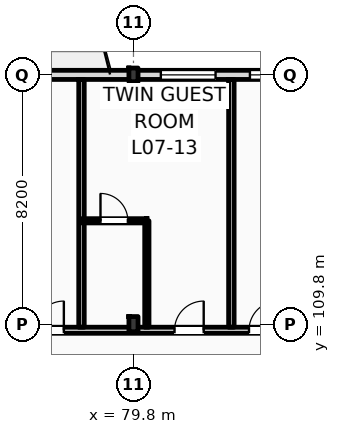
"""IFC4 building model, lengths in metres.
Left out: names, types, materials, properties, quantities, classifications, styles, units other than length and angle.
Written with IfcOpenShell. Run it as: python <this file> out.ifc"""

import sys

from ifc_helpers import new_model, si_unit, direction, frame, frame_2d, origin, origin_2d, place, context, subcontext, project, spatial, rectangle, i_section, extrude, element, fill, save


model = new_model("IFC4")
c1 = context("Model", 3, precision=1e-05, world=origin(), true_north=direction((0.0, 1.0)))
c2 = subcontext(c1, "Body", "Model", "MODEL_VIEW")
j1 = project(units=[si_unit("LENGTHUNIT", "METRE"), si_unit("PLANEANGLEUNIT", "RADIAN")], contexts=[c1])
p1 = place(None, origin())
s1 = spatial("IfcSite", under=j1, at=p1, CompositionType="ELEMENT")
p2 = place(p1, origin())
s2 = spatial("IfcBuilding", under=s1, at=p2, CompositionType="ELEMENT")
p3 = place(p2, frame((0.0, 0.0, 31.8)))
s3 = spatial("IfcBuildingStorey", under=s2, at=p3, CompositionType="ELEMENT", Elevation=31.8)
p4 = place(p3, frame((79.8, 109.8, 0.0), z_axis=(0.0, 0.0, 1.0), x_axis=(1.0, 0.0, 0.0)))
e1 = element("IfcColumn", 1, at=p4, inside=s3, PredefinedType="COLUMN", context=c2, shape_type="SweptSolid", body=[
    extrude(i_section(OverallWidth=0.3, OverallDepth=0.5, WebThickness=0.014, FlangeThickness=0.028, FilletRadius=0.027, at=origin_2d()), origin(), (0.0, 0.0, 1.0), 3.6),
])
p5 = place(p3, frame((79.8, 118.0, 0.0), z_axis=(0.0, 0.0, 1.0), x_axis=(1.0, 0.0, 0.0)))
e2 = element("IfcColumn", 2, at=p5, inside=s3, PredefinedType="COLUMN", context=c2, shape_type="SweptSolid", body=[
    extrude(i_section(OverallWidth=0.3, OverallDepth=0.45, WebThickness=0.014, FlangeThickness=0.026, FilletRadius=0.027, at=origin_2d()), origin(), (0.0, 0.0, 1.0), 3.6),
])
p6 = place(p3, frame((22.5, 118.0, 0.0), z_axis=(0.0, 0.0, 1.0), x_axis=(1.0, 0.0, 0.0)))
e3 = element("IfcWall", 3, at=p6, inside=s3, PredefinedType="STANDARD", context=c2, shape_type="SweptSolid", body=[
    extrude(rectangle(XDim=97.5, YDim=0.3, at=frame_2d((48.75, 0.0))), origin(), (0.0, 0.0, 1.0), 2.72),
])
p7 = place(p6, frame((3.61, 0.0, 0.9)))
e4 = element("IfcOpeningElement", 4, at=p7, cuts=e3, PredefinedType="OPENING", context=c2, shape_type="SweptSolid", body=[
    extrude(rectangle(XDim=1.1, YDim=1.64, at=frame_2d((0.55, 0.82))), frame((0.0, 0.16, 0.0), z_axis=(0.0, -1.0, 0.0), x_axis=(1.0, 0.0, 0.0)), (0.0, 0.0, 1.0), 0.32),
])
p8 = place(p6, frame((6.855, 0.0, 0.0)))
e5 = element("IfcOpeningElement", 5, at=p8, cuts=e3, PredefinedType="OPENING", context=c2, shape_type="SweptSolid", body=[
    extrude(rectangle(XDim=1.2, YDim=2.25, at=frame_2d((0.6, 1.125))), frame((0.0, 0.16, 0.0), z_axis=(0.0, -1.0, 0.0), x_axis=(1.0, 0.0, 0.0)), (0.0, 0.0, 1.0), 0.32),
])
p9 = place(p6, frame((11.405, 0.0, 0.9)))
e6 = element("IfcOpeningElement", 6, at=p9, cuts=e3, PredefinedType="OPENING", context=c2, shape_type="SweptSolid", body=[
    extrude(rectangle(XDim=2.1, YDim=1.64, at=frame_2d((1.05, 0.82))), frame((0.0, 0.16, 0.0), z_axis=(0.0, -1.0, 0.0), x_axis=(1.0, 0.0, 0.0)), (0.0, 0.0, 1.0), 0.32),
])
p10 = place(p6, frame((15.13, 0.0, 0.9)))
e7 = element("IfcOpeningElement", 7, at=p10, cuts=e3, PredefinedType="OPENING", context=c2, shape_type="SweptSolid", body=[
    extrude(rectangle(XDim=2.25, YDim=1.64, at=frame_2d((1.125, 0.82))), frame((0.0, 0.16, 0.0), z_axis=(0.0, -1.0, 0.0), x_axis=(1.0, 0.0, 0.0)), (0.0, 0.0, 1.0), 0.32),
])
p11 = place(p6, frame((21.53, 0.0, 0.0)))
e8 = element("IfcOpeningElement", 8, at=p11, cuts=e3, PredefinedType="OPENING", context=c2, shape_type="SweptSolid", body=[
    extrude(rectangle(XDim=1.2, YDim=2.25, at=frame_2d((0.6, 1.125))), frame((0.0, 0.16, 0.0), z_axis=(0.0, -1.0, 0.0), x_axis=(1.0, 0.0, 0.0)), (0.0, 0.0, 1.0), 0.32),
])
p12 = place(p6, frame((24.18, 0.0, 0.9)))
e9 = element("IfcOpeningElement", 9, at=p12, cuts=e3, PredefinedType="OPENING", context=c2, shape_type="SweptSolid", body=[
    extrude(rectangle(XDim=1.1, YDim=1.64, at=frame_2d((0.55, 0.82))), frame((0.0, 0.16, 0.0), z_axis=(0.0, -1.0, 0.0), x_axis=(1.0, 0.0, 0.0)), (0.0, 0.0, 1.0), 0.32),
])
p13 = place(p6, frame((29.105, 0.0, 0.9)))
e10 = element("IfcOpeningElement", 10, at=p13, cuts=e3, PredefinedType="OPENING", context=c2, shape_type="SweptSolid", body=[
    extrude(rectangle(XDim=2.7, YDim=1.64, at=frame_2d((1.35, 0.82))), frame((0.0, 0.16, 0.0), z_axis=(0.0, -1.0, 0.0), x_axis=(1.0, 0.0, 0.0)), (0.0, 0.0, 1.0), 0.32),
])
p14 = place(p6, frame((34.83, 0.0, 0.9)))
e11 = element("IfcOpeningElement", 11, at=p14, cuts=e3, PredefinedType="OPENING", context=c2, shape_type="SweptSolid", body=[
    extrude(rectangle(XDim=1.8, YDim=1.64, at=frame_2d((0.9, 0.82))), frame((0.0, 0.16, 0.0), z_axis=(0.0, -1.0, 0.0), x_axis=(1.0, 0.0, 0.0)), (0.0, 0.0, 1.0), 0.32),
])
p15 = place(p6, frame((38.525, 0.0, 0.0)))
e12 = element("IfcOpeningElement", 12, at=p15, cuts=e3, PredefinedType="OPENING", context=c2, shape_type="SweptSolid", body=[
    extrude(rectangle(XDim=1.2, YDim=2.25, at=frame_2d((0.6, 1.125))), frame((0.0, 0.16, 0.0), z_axis=(0.0, -1.0, 0.0), x_axis=(1.0, 0.0, 0.0)), (0.0, 0.0, 1.0), 0.32),
])
p16 = place(p6, frame((42.73, 0.0, 0.9)))
e13 = element("IfcOpeningElement", 13, at=p16, cuts=e3, PredefinedType="OPENING", context=c2, shape_type="SweptSolid", body=[
    extrude(rectangle(XDim=3.05, YDim=1.64, at=frame_2d((1.525, 0.82))), frame((0.0, 0.16, 0.0), z_axis=(0.0, -1.0, 0.0), x_axis=(1.0, 0.0, 0.0)), (0.0, 0.0, 1.0), 0.32),
])
p17 = place(p6, frame((47.155, 0.0, 0.9)))
e14 = element("IfcOpeningElement", 14, at=p17, cuts=e3, PredefinedType="OPENING", context=c2, shape_type="SweptSolid", body=[
    extrude(rectangle(XDim=1.35, YDim=1.64, at=frame_2d((0.675, 0.82))), frame((0.0, 0.16, 0.0), z_axis=(0.0, -1.0, 0.0), x_axis=(1.0, 0.0, 0.0)), (0.0, 0.0, 1.0), 0.32),
])
p18 = place(p6, frame((53.065, 0.0, 0.0)))
e15 = element("IfcOpeningElement", 15, at=p18, cuts=e3, PredefinedType="OPENING", context=c2, shape_type="SweptSolid", body=[
    extrude(rectangle(XDim=1.2, YDim=2.25, at=frame_2d((0.6, 1.125))), frame((0.0, 0.16, 0.0), z_axis=(0.0, -1.0, 0.0), x_axis=(1.0, 0.0, 0.0)), (0.0, 0.0, 1.0), 0.32),
])
p19 = place(p6, frame((58.2, 0.0, 0.9)))
e16 = element("IfcOpeningElement", 16, at=p19, cuts=e3, PredefinedType="OPENING", context=c2, shape_type="SweptSolid", body=[
    extrude(rectangle(XDim=1.8, YDim=1.64, at=frame_2d((0.9, 0.82))), frame((0.0, 0.16, 0.0), z_axis=(0.0, -1.0, 0.0), x_axis=(1.0, 0.0, 0.0)), (0.0, 0.0, 1.0), 0.32),
])
p20 = place(p6, frame((61.13, 0.0, 0.9)))
e17 = element("IfcOpeningElement", 17, at=p20, cuts=e3, PredefinedType="OPENING", context=c2, shape_type="SweptSolid", body=[
    extrude(rectangle(XDim=3.05, YDim=1.64, at=frame_2d((1.525, 0.82))), frame((0.0, 0.16, 0.0), z_axis=(0.0, -1.0, 0.0), x_axis=(1.0, 0.0, 0.0)), (0.0, 0.0, 1.0), 0.32),
])
p21 = place(p6, frame((67.93, 0.0, 0.0)))
e18 = element("IfcOpeningElement", 18, at=p21, cuts=e3, PredefinedType="OPENING", context=c2, shape_type="SweptSolid", body=[
    extrude(rectangle(XDim=1.2, YDim=2.25, at=frame_2d((0.6, 1.125))), frame((0.0, 0.16, 0.0), z_axis=(0.0, -1.0, 0.0), x_axis=(1.0, 0.0, 0.0)), (0.0, 0.0, 1.0), 0.32),
])
p22 = place(p6, frame((70.39, 0.0, 0.0)))
e19 = element("IfcOpeningElement", 19, at=p22, cuts=e3, PredefinedType="OPENING", context=c2, shape_type="SweptSolid", body=[
    extrude(rectangle(XDim=1.2, YDim=2.25, at=frame_2d((0.6, 1.125))), frame((0.0, 0.16, 0.0), z_axis=(0.0, -1.0, 0.0), x_axis=(1.0, 0.0, 0.0)), (0.0, 0.0, 1.0), 0.32),
])
p23 = place(p6, frame((75.905, 0.0, 0.9)))
e20 = element("IfcOpeningElement", 20, at=p23, cuts=e3, PredefinedType="OPENING", context=c2, shape_type="SweptSolid", body=[
    extrude(rectangle(XDim=1.1, YDim=1.5, at=frame_2d((0.55, 0.75))), frame((0.0, 0.16, 0.0), z_axis=(0.0, -1.0, 0.0), x_axis=(1.0, 0.0, 0.0)), (0.0, 0.0, 1.0), 0.32),
])
p24 = place(p6, frame((81.63, 0.0, 0.9)))
e21 = element("IfcOpeningElement", 21, at=p24, cuts=e3, PredefinedType="OPENING", context=c2, shape_type="SweptSolid", body=[
    extrude(rectangle(XDim=1.1, YDim=1.6, at=frame_2d((0.55, 0.8))), frame((0.0, 0.16, 0.0), z_axis=(0.0, -1.0, 0.0), x_axis=(1.0, 0.0, 0.0)), (0.0, 0.0, 1.0), 0.32),
])
p25 = place(p6, frame((84.955, 0.0, 0.9)))
e22 = element("IfcOpeningElement", 22, at=p25, cuts=e3, PredefinedType="OPENING", context=c2, shape_type="SweptSolid", body=[
    extrude(rectangle(XDim=1.4, YDim=1.64, at=frame_2d((0.7, 0.82))), frame((0.0, 0.16, 0.0), z_axis=(0.0, -1.0, 0.0), x_axis=(1.0, 0.0, 0.0)), (0.0, 0.0, 1.0), 0.32),
])
p26 = place(p6, frame((90.055, 0.0, 0.9)))
e23 = element("IfcOpeningElement", 23, at=p26, cuts=e3, PredefinedType="OPENING", context=c2, shape_type="SweptSolid", body=[
    extrude(rectangle(XDim=1.6, YDim=1.64, at=frame_2d((0.8, 0.82))), frame((0.0, 0.16, 0.0), z_axis=(0.0, -1.0, 0.0), x_axis=(1.0, 0.0, 0.0)), (0.0, 0.0, 1.0), 0.32),
])
p27 = place(p6, frame((93.87, 0.0, 0.9)))
e24 = element("IfcOpeningElement", 24, at=p27, cuts=e3, PredefinedType="OPENING", context=c2, shape_type="SweptSolid", body=[
    extrude(rectangle(XDim=1.75, YDim=1.64, at=frame_2d((0.875, 0.82))), frame((0.0, 0.16, 0.0), z_axis=(0.0, -1.0, 0.0), x_axis=(1.0, 0.0, 0.0)), (0.0, 0.0, 1.0), 0.32),
])
p28 = place(p3, frame((10.65, 109.6, 0.0), z_axis=(0.0, 0.0, 1.0), x_axis=(1.0, 0.0, 0.0)))
e25 = element("IfcWall", 25, at=p28, inside=s3, PredefinedType="PARTITIONING", context=c2, shape_type="SweptSolid", body=[
    extrude(rectangle(XDim=109.21, YDim=0.2, at=frame_2d((54.605, 0.0))), origin(), (0.0, 0.0, 1.0), 2.72),
])
p29 = place(p28, frame((15.825, 0.0, 0.0)))
e26 = element("IfcOpeningElement", 26, at=p29, cuts=e25, PredefinedType="OPENING", context=c2, shape_type="SweptSolid", body=[
    extrude(rectangle(XDim=1.02, YDim=2.2, at=frame_2d((0.51, 1.1))), frame((0.0, 0.11, 0.0), z_axis=(0.0, -1.0, 0.0), x_axis=(1.0, 0.0, 0.0)), (0.0, 0.0, 1.0), 0.22),
])
p30 = place(p28, frame((19.87, 0.0, 0.0)))
e27 = element("IfcOpeningElement", 27, at=p30, cuts=e25, PredefinedType="OPENING", context=c2, shape_type="SweptSolid", body=[
    extrude(rectangle(XDim=1.02, YDim=2.2, at=frame_2d((0.51, 1.1))), frame((0.0, 0.11, 0.0), z_axis=(0.0, -1.0, 0.0), x_axis=(1.0, 0.0, 0.0)), (0.0, 0.0, 1.0), 0.22),
])
p31 = place(p28, frame((24.47, 0.0, 0.0)))
e28 = element("IfcOpeningElement", 28, at=p31, cuts=e25, PredefinedType="OPENING", context=c2, shape_type="SweptSolid", body=[
    extrude(rectangle(XDim=1.02, YDim=2.2, at=frame_2d((0.51, 1.1))), frame((0.0, 0.11, 0.0), z_axis=(0.0, -1.0, 0.0), x_axis=(1.0, 0.0, 0.0)), (0.0, 0.0, 1.0), 0.22),
])
p32 = place(p28, frame((26.92, 0.0, 0.0)))
e29 = element("IfcOpeningElement", 29, at=p32, cuts=e25, PredefinedType="OPENING", context=c2, shape_type="SweptSolid", body=[
    extrude(rectangle(XDim=1.02, YDim=2.2, at=frame_2d((0.51, 1.1))), frame((0.0, 0.11, 0.0), z_axis=(0.0, -1.0, 0.0), x_axis=(1.0, 0.0, 0.0)), (0.0, 0.0, 1.0), 0.22),
])
p33 = place(p28, frame((33.7, 0.0, 0.0)))
e30 = element("IfcOpeningElement", 30, at=p33, cuts=e25, PredefinedType="OPENING", context=c2, shape_type="SweptSolid", body=[
    extrude(rectangle(XDim=0.96, YDim=2.2, at=frame_2d((0.48, 1.1))), frame((0.0, 0.11, 0.0), z_axis=(0.0, -1.0, 0.0), x_axis=(1.0, 0.0, 0.0)), (0.0, 0.0, 1.0), 0.22),
])
p34 = place(p28, frame((35.9, 0.0, 0.0)))
e31 = element("IfcOpeningElement", 31, at=p34, cuts=e25, PredefinedType="OPENING", context=c2, shape_type="SweptSolid", body=[
    extrude(rectangle(XDim=0.96, YDim=2.2, at=frame_2d((0.48, 1.1))), frame((0.0, 0.11, 0.0), z_axis=(0.0, -1.0, 0.0), x_axis=(1.0, 0.0, 0.0)), (0.0, 0.0, 1.0), 0.22),
])
p35 = place(p28, frame((42.9, 0.0, 0.0)))
e32 = element("IfcOpeningElement", 32, at=p35, cuts=e25, PredefinedType="OPENING", context=c2, shape_type="SweptSolid", body=[
    extrude(rectangle(XDim=0.96, YDim=2.2, at=frame_2d((0.48, 1.1))), frame((0.0, 0.11, 0.0), z_axis=(0.0, -1.0, 0.0), x_axis=(1.0, 0.0, 0.0)), (0.0, 0.0, 1.0), 0.22),
])
p36 = place(p28, frame((47.5, 0.0, 0.0)))
e33 = element("IfcOpeningElement", 33, at=p36, cuts=e25, PredefinedType="OPENING", context=c2, shape_type="SweptSolid", body=[
    extrude(rectangle(XDim=0.96, YDim=2.2, at=frame_2d((0.48, 1.1))), frame((0.0, 0.11, 0.0), z_axis=(0.0, -1.0, 0.0), x_axis=(1.0, 0.0, 0.0)), (0.0, 0.0, 1.0), 0.22),
])
p37 = place(p28, frame((49.95, 0.0, 0.0)))
e34 = element("IfcOpeningElement", 34, at=p37, cuts=e25, PredefinedType="OPENING", context=c2, shape_type="SweptSolid", body=[
    extrude(rectangle(XDim=0.96, YDim=2.2, at=frame_2d((0.48, 1.1))), frame((0.0, 0.11, 0.0), z_axis=(0.0, -1.0, 0.0), x_axis=(1.0, 0.0, 0.0)), (0.0, 0.0, 1.0), 0.22),
])
p38 = place(p28, frame((56.7, 0.0, 0.0)))
e35 = element("IfcOpeningElement", 35, at=p38, cuts=e25, PredefinedType="OPENING", context=c2, shape_type="SweptSolid", body=[
    extrude(rectangle(XDim=0.96, YDim=2.2, at=frame_2d((0.48, 1.1))), frame((0.0, 0.11, 0.0), z_axis=(0.0, -1.0, 0.0), x_axis=(1.0, 0.0, 0.0)), (0.0, 0.0, 1.0), 0.22),
])
p39 = place(p28, frame((59.15, 0.0, 0.0)))
e36 = element("IfcOpeningElement", 36, at=p39, cuts=e25, PredefinedType="OPENING", context=c2, shape_type="SweptSolid", body=[
    extrude(rectangle(XDim=0.96, YDim=2.2, at=frame_2d((0.48, 1.1))), frame((0.0, 0.11, 0.0), z_axis=(0.0, -1.0, 0.0), x_axis=(1.0, 0.0, 0.0)), (0.0, 0.0, 1.0), 0.22),
])
p40 = place(p28, frame((65.9, 0.0, 0.0)))
e37 = element("IfcOpeningElement", 37, at=p40, cuts=e25, PredefinedType="OPENING", context=c2, shape_type="SweptSolid", body=[
    extrude(rectangle(XDim=0.96, YDim=2.2, at=frame_2d((0.48, 1.1))), frame((0.0, 0.11, 0.0), z_axis=(0.0, -1.0, 0.0), x_axis=(1.0, 0.0, 0.0)), (0.0, 0.0, 1.0), 0.22),
])
p41 = place(p28, frame((70.5, 0.0, 0.0)))
e38 = element("IfcOpeningElement", 38, at=p41, cuts=e25, PredefinedType="OPENING", context=c2, shape_type="SweptSolid", body=[
    extrude(rectangle(XDim=0.96, YDim=2.2, at=frame_2d((0.48, 1.1))), frame((0.0, 0.11, 0.0), z_axis=(0.0, -1.0, 0.0), x_axis=(1.0, 0.0, 0.0)), (0.0, 0.0, 1.0), 0.22),
])
p42 = place(p28, frame((72.95, 0.0, 0.0)))
e39 = element("IfcOpeningElement", 39, at=p42, cuts=e25, PredefinedType="OPENING", context=c2, shape_type="SweptSolid", body=[
    extrude(rectangle(XDim=0.96, YDim=2.2, at=frame_2d((0.48, 1.1))), frame((0.0, 0.11, 0.0), z_axis=(0.0, -1.0, 0.0), x_axis=(1.0, 0.0, 0.0)), (0.0, 0.0, 1.0), 0.22),
])
p43 = place(p28, frame((79.7, 0.0, 0.0)))
e40 = element("IfcOpeningElement", 40, at=p43, cuts=e25, PredefinedType="OPENING", context=c2, shape_type="SweptSolid", body=[
    extrude(rectangle(XDim=0.96, YDim=2.2, at=frame_2d((0.48, 1.1))), frame((0.0, 0.11, 0.0), z_axis=(0.0, -1.0, 0.0), x_axis=(1.0, 0.0, 0.0)), (0.0, 0.0, 1.0), 0.22),
])
p44 = place(p28, frame((82.15, 0.0, 0.0)))
e41 = element("IfcOpeningElement", 41, at=p44, cuts=e25, PredefinedType="OPENING", context=c2, shape_type="SweptSolid", body=[
    extrude(rectangle(XDim=0.96, YDim=2.2, at=frame_2d((0.48, 1.1))), frame((0.0, 0.11, 0.0), z_axis=(0.0, -1.0, 0.0), x_axis=(1.0, 0.0, 0.0)), (0.0, 0.0, 1.0), 0.22),
])
p45 = place(p28, frame((88.9, 0.0, 0.0)))
e42 = element("IfcOpeningElement", 42, at=p45, cuts=e25, PredefinedType="OPENING", context=c2, shape_type="SweptSolid", body=[
    extrude(rectangle(XDim=0.96, YDim=2.2, at=frame_2d((0.48, 1.1))), frame((0.0, 0.11, 0.0), z_axis=(0.0, -1.0, 0.0), x_axis=(1.0, 0.0, 0.0)), (0.0, 0.0, 1.0), 0.22),
])
p46 = place(p28, frame((93.75, 0.0, 0.0)))
e43 = element("IfcOpeningElement", 43, at=p46, cuts=e25, PredefinedType="OPENING", context=c2, shape_type="SweptSolid", body=[
    extrude(rectangle(XDim=0.96, YDim=2.2, at=frame_2d((0.48, 1.1))), frame((0.0, 0.11, 0.0), z_axis=(0.0, -1.0, 0.0), x_axis=(1.0, 0.0, 0.0)), (0.0, 0.0, 1.0), 0.22),
])
p47 = place(p28, frame((98.1, 0.0, 0.0)))
e44 = element("IfcOpeningElement", 44, at=p47, cuts=e25, PredefinedType="OPENING", context=c2, shape_type="SweptSolid", body=[
    extrude(rectangle(XDim=0.96, YDim=2.2, at=frame_2d((0.48, 1.1))), frame((0.0, 0.11, 0.0), z_axis=(0.0, -1.0, 0.0), x_axis=(1.0, 0.0, 0.0)), (0.0, 0.0, 1.0), 0.22),
])
p48 = place(p28, frame((102.7, 0.0, 0.0)))
e45 = element("IfcOpeningElement", 45, at=p48, cuts=e25, PredefinedType="OPENING", context=c2, shape_type="SweptSolid", body=[
    extrude(rectangle(XDim=0.96, YDim=2.2, at=frame_2d((0.48, 1.1))), frame((0.0, 0.11, 0.0), z_axis=(0.0, -1.0, 0.0), x_axis=(1.0, 0.0, 0.0)), (0.0, 0.0, 1.0), 0.22),
])
p49 = place(p28, frame((105.04, 0.0, 0.0)))
e46 = element("IfcOpeningElement", 46, at=p49, cuts=e25, PredefinedType="OPENING", context=c2, shape_type="SweptSolid", body=[
    extrude(rectangle(XDim=0.96, YDim=2.2, at=frame_2d((0.48, 1.1))), frame((0.0, 0.11, 0.0), z_axis=(0.0, -1.0, 0.0), x_axis=(1.0, 0.0, 0.0)), (0.0, 0.0, 1.0), 0.22),
])
p50 = place(p28, frame((2.716, 0.0, 0.0)))
e47 = element("IfcOpeningElement", 47, at=p50, cuts=e25, PredefinedType="OPENING", context=c2, shape_type="SweptSolid", body=[
    extrude(rectangle(XDim=1.35, YDim=2.25, at=frame_2d((0.675, 1.125))), frame((0.0, 0.11, 0.0), z_axis=(0.0, -1.0, 0.0), x_axis=(1.0, 0.0, 0.0)), (0.0, 0.0, 1.0), 0.22),
])
p51 = place(p28, frame((6.65, 0.0, 0.0)))
e48 = element("IfcOpeningElement", 48, at=p51, cuts=e25, PredefinedType="OPENING", context=c2, shape_type="SweptSolid", body=[
    extrude(rectangle(XDim=1.35, YDim=2.25, at=frame_2d((0.675, 1.125))), frame((0.0, 0.11, 0.0), z_axis=(0.0, -1.0, 0.0), x_axis=(1.0, 0.0, 0.0)), (0.0, 0.0, 1.0), 0.22),
])
p52 = place(p28, frame((10.583, 0.0, 0.0)))
e49 = element("IfcOpeningElement", 49, at=p52, cuts=e25, PredefinedType="OPENING", context=c2, shape_type="SweptSolid", body=[
    extrude(rectangle(XDim=1.35, YDim=2.25, at=frame_2d((0.675, 1.125))), frame((0.0, 0.11, 0.0), z_axis=(0.0, -1.0, 0.0), x_axis=(1.0, 0.0, 0.0)), (0.0, 0.0, 1.0), 0.22),
])
for number, where, z_axis, x_axis in (
    (50, (78.09, 109.7, 0.0), (0.0, 0.0, 1.0), (0.0, 1.0, 0.0)),
    (51, (83.02, 109.7, 0.0), (0.0, 0.0, 1.0), (0.0, 1.0, 0.0)),
):
    element("IfcWall", number, at=place(p3, frame(where, z_axis=z_axis, x_axis=x_axis)), inside=s3, PredefinedType="PARTITIONING", context=c2, shape_type="SweptSolid", body=[
        extrude(rectangle(XDim=8.15, YDim=0.18, at=frame_2d((4.075, 0.0))), origin(), (0.0, 0.0, 1.0), 3.36),
    ])
p53 = place(p3, frame((80.24, 109.7, 0.0), z_axis=(0.0, 0.0, 1.0), x_axis=(0.0, 1.0, 0.0)))
e52 = element("IfcWall", 52, at=p53, inside=s3, PredefinedType="PARTITIONING", context=c2, shape_type="SweptSolid", body=[
    extrude(rectangle(XDim=3.5, YDim=0.14, at=frame_2d((1.75, 0.0))), origin(), (0.0, 0.0, 1.0), 3.36),
])
p54 = place(p3, frame((78.09, 113.2, 0.0), z_axis=(0.0, 0.0, 1.0), x_axis=(1.0, 0.0, 0.0)))
e53 = element("IfcWall", 53, at=p54, inside=s3, PredefinedType="PARTITIONING", context=c2, shape_type="SweptSolid", body=[
    extrude(rectangle(XDim=2.15, YDim=0.14, at=frame_2d((1.075, 0.0))), origin(), (0.0, 0.0, 1.0), 3.36),
])
p55 = place(p54, frame((0.625, 0.0, 0.0)))
e54 = element("IfcOpeningElement", 54, at=p55, cuts=e53, PredefinedType="OPENING", context=c2, shape_type="SweptSolid", body=[
    extrude(rectangle(XDim=0.9, YDim=2.1, at=frame_2d((0.45, 1.05))), frame((0.0, 0.08, 0.0), z_axis=(0.0, -1.0, 0.0), x_axis=(1.0, 0.0, 0.0)), (0.0, 0.0, 1.0), 0.16),
])
p56 = place(p19, origin())
e55 = element("IfcWindow", 55, at=p56, inside=s3, PartitioningType="DOUBLE_PANEL_VERTICAL", PredefinedType="WINDOW", context=c2, shape_type="SweptSolid", body=[
    extrude(rectangle(XDim=1.8, YDim=1.64, at=frame_2d((0.9, 0.82))), frame((0.0, 0.03, 0.0), z_axis=(0.0, -1.0, 0.0), x_axis=(1.0, 0.0, 0.0)), (0.0, 0.0, 1.0), 0.06),
])
fill(e16, e55)
p57 = place(p20, origin())
e56 = element("IfcWindow", 56, at=p57, inside=s3, PartitioningType="DOUBLE_PANEL_VERTICAL", PredefinedType="WINDOW", context=c2, shape_type="SweptSolid", body=[
    extrude(rectangle(XDim=3.05, YDim=1.64, at=frame_2d((1.525, 0.82))), frame((0.0, 0.03, 0.0), z_axis=(0.0, -1.0, 0.0), x_axis=(1.0, 0.0, 0.0)), (0.0, 0.0, 1.0), 0.06),
])
fill(e17, e56)
p58 = place(p40, origin())
e57 = element("IfcDoor", 57, at=p58, inside=s3, OperationType="SINGLE_SWING_RIGHT", PredefinedType="DOOR", context=c2, shape_type="SweptSolid", body=[
    extrude(rectangle(XDim=0.96, YDim=2.2, at=frame_2d((0.48, 1.1))), frame((0.0, 0.025, 0.0), z_axis=(0.0, -1.0, 0.0), x_axis=(1.0, 0.0, 0.0)), (0.0, 0.0, 1.0), 0.05),
])
fill(e37, e57)
p59 = place(p41, origin())
e58 = element("IfcDoor", 58, at=p59, inside=s3, OperationType="SINGLE_SWING_RIGHT", PredefinedType="DOOR", context=c2, shape_type="SweptSolid", body=[
    extrude(rectangle(XDim=0.96, YDim=2.2, at=frame_2d((0.48, 1.1))), frame((0.0, 0.025, 0.0), z_axis=(0.0, -1.0, 0.0), x_axis=(1.0, 0.0, 0.0)), (0.0, 0.0, 1.0), 0.05),
])
fill(e38, e58)
p60 = place(p55, origin())
e59 = element("IfcDoor", 59, at=p60, inside=s3, OperationType="SINGLE_SWING_LEFT", PredefinedType="DOOR", context=c2, shape_type="SweptSolid", body=[
    extrude(rectangle(XDim=0.9, YDim=2.1, at=frame_2d((0.45, 1.05))), frame((0.0, 0.025, 0.0), z_axis=(0.0, -1.0, 0.0), x_axis=(1.0, 0.0, 0.0)), (0.0, 0.0, 1.0), 0.05),
])
fill(e54, e59)
p61 = place(p42, origin())
e60 = element("IfcDoor", 60, at=p61, inside=s3, OperationType="SINGLE_SWING_RIGHT", PredefinedType="DOOR", context=c2, shape_type="SweptSolid", body=[
    extrude(rectangle(XDim=0.96, YDim=2.2, at=frame_2d((0.48, 1.1))), frame((0.0, 0.025, 0.0), z_axis=(0.0, -1.0, 0.0), x_axis=(1.0, 0.0, 0.0)), (0.0, 0.0, 1.0), 0.05),
])
fill(e39, e60)
save(model, sys.argv[1])
